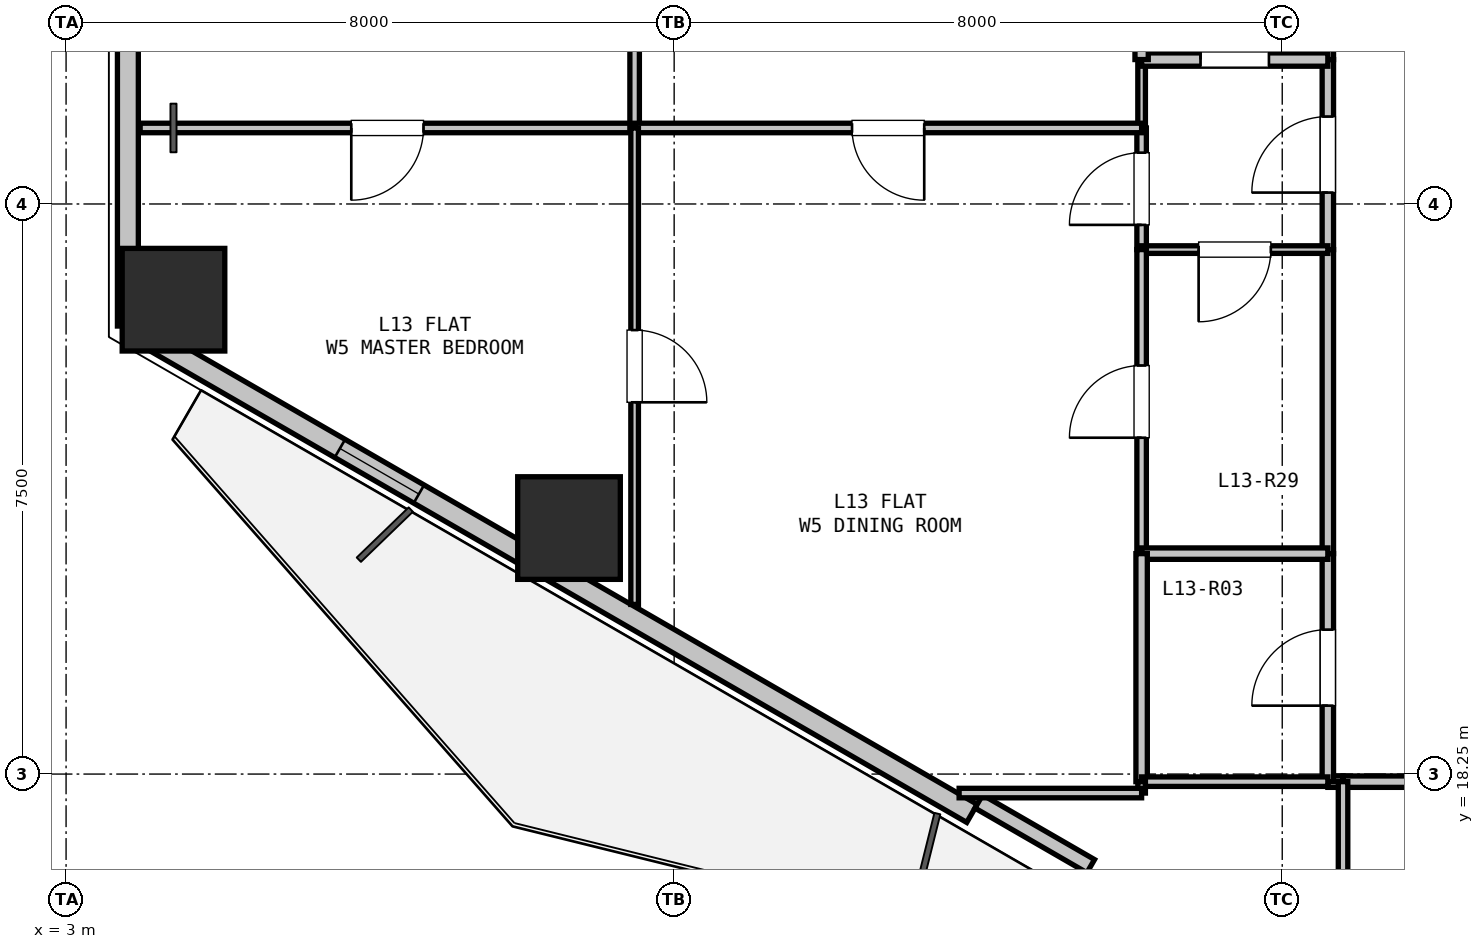
"""IFC4 building model, lengths in metres.
Left out: names, types, materials, properties, quantities, classifications, styles, units other than length and angle.
Written with IfcOpenShell. Run it as: python <this file> out.ifc"""

import sys

from ifc_helpers import new_model, si_unit, direction, frame, frame_2d, origin, origin_2d, place, context, subcontext, project, spatial, rectangle, hollow_rectangle, extrude, element, fill, save


model = new_model("IFC4")
c1 = context("Model", 3, precision=1e-05, world=origin(), true_north=direction((0.0, 1.0)))
c2 = subcontext(c1, "Body", "Model", "MODEL_VIEW")
j1 = project(units=[si_unit("LENGTHUNIT", "METRE"), si_unit("PLANEANGLEUNIT", "RADIAN")], contexts=[c1])
p1 = place(None, origin())
s1 = spatial("IfcSite", under=j1, at=p1, CompositionType="ELEMENT")
p2 = place(p1, origin())
s2 = spatial("IfcBuilding", under=s1, at=p2, CompositionType="ELEMENT")
p3 = place(p2, frame((0.0, 0.0, 48.9)))
s3 = spatial("IfcBuildingStorey", under=s2, at=p3, CompositionType="ELEMENT", Elevation=48.9)
for number, where, z_axis, x_axis in (
    (1, (9.617, 21.486, 0.0), (0.0, 0.0, 1.0), (1.0, 0.0, 0.0)),
    (2, (4.413, 24.491, 0.0), (0.0, 0.0, 1.0), (1.0, 0.0, 0.0)),
):
    element("IfcColumn", number, at=place(p3, frame(where, z_axis=z_axis, x_axis=x_axis)), inside=s3, PredefinedType="COLUMN", context=c2, shape_type="SweptSolid", body=[
        extrude(hollow_rectangle(XDim=1.35, YDim=1.35, WallThickness=0.036, at=origin_2d()), origin(), (0.0, 0.0, 1.0), 3.3),
    ])
p4 = place(p3, frame((3.813, 24.144, 0.0), z_axis=(0.0, 0.0, 1.0), x_axis=(0.0, 1.0, 0.0)))
e3 = element("IfcWall", 3, at=p4, inside=s3, PredefinedType="SOLIDWALL", context=c2, shape_type="SweptSolid", body=[
    extrude(rectangle(XDim=5.211, YDim=0.275, at=frame_2d((2.606, 0.0))), origin(), (0.0, 0.0, 1.0), 2.66),
])
p5 = place(p3, frame((14.918, 17.733, 0.0), z_axis=(0.0, 0.0, 1.0), x_axis=(-0.866027105532, 0.499997052475, 0.0)))
e4 = element("IfcWall", 4, at=p5, inside=s3, PredefinedType="SOLIDWALL", context=c2, shape_type="SweptSolid", body=[
    extrude(rectangle(XDim=12.673, YDim=0.275, at=frame_2d((6.336, 0.0))), origin(), (0.0, 0.0, 1.0), 2.66),
])
p6 = place(p5, frame((8.402, 0.0, 0.9)))
e5 = element("IfcOpeningElement", 5, at=p6, cuts=e4, PredefinedType="OPENING", context=c2, shape_type="SweptSolid", body=[
    extrude(rectangle(XDim=1.2, YDim=1.4, at=frame_2d((0.6, 0.7))), frame((0.0, 0.147, 0.0), z_axis=(0.0, -1.0, 0.0), x_axis=(1.0, 0.0, 0.0)), (0.0, 0.0, 1.0), 0.295),
])
p7 = place(p3, frame((16.48, 17.039, 0.0), z_axis=(0.0, 0.0, 1.0), x_axis=(-0.86605165483, 0.499954529098, 0.0)))
e6 = element("IfcWall", 6, at=p7, inside=s3, PredefinedType="PARAPET", context=c2, shape_type="SweptSolid", body=[
    extrude(rectangle(XDim=1.7, YDim=0.2, at=frame_2d((0.85, 0.0))), origin(), (0.0, 0.0, 1.0), 2.66),
])
p8 = place(p3, frame((22.6, 18.15, 0.0), z_axis=(0.0, 0.0, 1.0), x_axis=(-1.0, 0.0, 0.0)))
e7 = element("IfcWall", 7, at=p8, inside=s3, PredefinedType="PARTITIONING", context=c2, shape_type="SweptSolid", body=[
    extrude(rectangle(XDim=2.8, YDim=0.15, at=frame_2d((1.4, 0.0))), origin(), (0.0, 0.0, 1.0), 3.04),
])
p9 = place(p8, frame((0.9, 0.0, 0.0)))
e8 = element("IfcOpeningElement", 8, at=p9, cuts=e7, PredefinedType="OPENING", context=c2, shape_type="SweptSolid", body=[
    extrude(rectangle(XDim=1.0, YDim=2.15, at=frame_2d((0.5, 1.075))), frame((0.0, 0.085, 0.0), z_axis=(0.0, -1.0, 0.0), x_axis=(1.0, 0.0, 0.0)), (0.0, 0.0, 1.0), 0.17),
])
p10 = place(p3, frame((19.8, 18.15, 0.0), z_axis=(0.0, 0.0, 1.0), x_axis=(-1.0, 0.0, 0.0)))
e9 = element("IfcWall", 9, at=p10, inside=s3, PredefinedType="PARTITIONING", context=c2, shape_type="SweptSolid", body=[
    extrude(rectangle(XDim=0.2, YDim=0.15, at=frame_2d((0.1, 0.0))), origin(), (0.0, 0.0, 1.0), 3.04),
])
p11 = place(p3, frame((19.6, 18.15, 0.0), z_axis=(0.0, 0.0, 1.0), x_axis=(0.0, 1.0, 0.0)))
e10 = element("IfcWall", 10, at=p11, inside=s3, PredefinedType="PARTITIONING", context=c2, shape_type="SweptSolid", body=[
    extrude(rectangle(XDim=3.0, YDim=0.15, at=frame_2d((1.5, 0.0))), origin(), (0.0, 0.0, 1.0), 2.338),
])
p12 = place(p11, frame((1.0, 0.0, 0.0)))
e11 = element("IfcOpeningElement", 11, at=p12, cuts=e10, PredefinedType="OPENING", context=c2, shape_type="SweptSolid", body=[
    extrude(rectangle(XDim=1.0, YDim=2.15, at=frame_2d((0.5, 1.075))), frame((0.0, 0.085, 0.0), z_axis=(0.0, -1.0, 0.0), x_axis=(1.0, 0.0, 0.0)), (0.0, 0.0, 1.0), 0.17),
])
p13 = place(p3, frame((19.6, 21.15, 0.0), z_axis=(0.0, 0.0, 1.0), x_axis=(0.0, 1.0, 0.0)))
e12 = element("IfcWall", 12, at=p13, inside=s3, PredefinedType="PARTITIONING", context=c2, shape_type="SweptSolid", body=[
    extrude(rectangle(XDim=4.0, YDim=0.15, at=frame_2d((2.0, 0.0))), origin(), (0.0, 0.0, 1.0), 3.04),
])
p14 = place(p3, frame((19.6, 25.15, 0.0), z_axis=(0.0, 0.0, 1.0), x_axis=(0.0, 1.0, 0.0)))
e13 = element("IfcWall", 13, at=p14, inside=s3, PredefinedType="PARTITIONING", context=c2, shape_type="SweptSolid", body=[
    extrude(rectangle(XDim=2.5, YDim=0.15, at=frame_2d((1.25, 0.0))), origin(), (0.0, 0.0, 1.0), 3.04),
])
p15 = place(p14, frame((0.75, 0.0, 0.0)))
e14 = element("IfcOpeningElement", 14, at=p15, cuts=e13, PredefinedType="OPENING", context=c2, shape_type="SweptSolid", body=[
    extrude(rectangle(XDim=1.0, YDim=2.15, at=frame_2d((0.5, 1.075))), frame((0.0, 0.085, 0.0), z_axis=(0.0, -1.0, 0.0), x_axis=(1.0, 0.0, 0.0)), (0.0, 0.0, 1.0), 0.17),
])
p16 = place(p3, frame((19.6, 27.65, 0.0), z_axis=(0.0, 0.0, 1.0), x_axis=(0.0, 1.0, 0.0)))
e15 = element("IfcWall", 15, at=p16, inside=s3, PredefinedType="PARTITIONING", context=c2, shape_type="SweptSolid", body=[
    extrude(rectangle(XDim=2.1, YDim=0.15, at=frame_2d((1.05, 0.0))), origin(), (0.0, 0.0, 1.0), 3.04),
])
p17 = place(p3, frame((17.15, 25.15, 0.0), z_axis=(0.0, 0.0, 1.0), x_axis=(0.0, 1.0, 0.0)))
e16 = element("IfcWall", 16, at=p17, inside=s3, PredefinedType="PARTITIONING", context=c2, shape_type="SweptSolid", body=[
    extrude(rectangle(XDim=1.6, YDim=0.125, at=frame_2d((0.8, 0.0))), origin(), (0.0, 0.0, 1.0), 3.04),
])
p18 = place(p17, frame((0.325, 0.0, 0.0)))
e17 = element("IfcOpeningElement", 17, at=p18, cuts=e16, PredefinedType="OPENING", context=c2, shape_type="SweptSolid", body=[
    extrude(rectangle(XDim=0.95, YDim=2.1, at=frame_2d((0.475, 1.05))), frame((0.0, 0.073, 0.0), z_axis=(0.0, -1.0, 0.0), x_axis=(1.0, 0.0, 0.0)), (0.0, 0.0, 1.0), 0.145),
])
p19 = place(p3, frame((17.15, 26.75, 0.0), z_axis=(0.0, 0.0, 1.0), x_axis=(0.0, 1.0, 0.0)))
e18 = element("IfcWall", 18, at=p19, inside=s3, PredefinedType="PARTITIONING", context=c2, shape_type="SweptSolid", body=[
    extrude(rectangle(XDim=0.9, YDim=0.1, at=frame_2d((0.45, 0.0))), origin(), (0.0, 0.0, 1.0), 3.04),
])
p20 = place(p3, frame((17.15, 27.65, 0.0), z_axis=(0.0, 0.0, 1.0), x_axis=(1.0, 0.0, 0.0)))
e19 = element("IfcWall", 19, at=p20, inside=s3, PredefinedType="PLUMBINGWALL", context=c2, shape_type="SweptSolid", body=[
    extrude(rectangle(XDim=2.45, YDim=0.175, at=frame_2d((1.225, 0.0))), origin(), (0.0, 0.0, 1.0), 3.04),
])
p21 = place(p20, frame((0.775, 0.0, 0.0)))
e20 = element("IfcOpeningElement", 20, at=p21, cuts=e19, PredefinedType="OPENING", context=c2, shape_type="SweptSolid", body=[
    extrude(rectangle(XDim=0.9, YDim=2.1, at=frame_2d((0.45, 1.05))), frame((0.0, 0.097, 0.0), z_axis=(0.0, -1.0, 0.0), x_axis=(1.0, 0.0, 0.0)), (0.0, 0.0, 1.0), 0.195),
])
p22 = place(p3, frame((19.6, 25.15, 0.0), z_axis=(0.0, 0.0, 1.0), x_axis=(-1.0, 0.0, 0.0)))
e21 = element("IfcWall", 21, at=p22, inside=s3, PredefinedType="PARTITIONING", context=c2, shape_type="SweptSolid", body=[
    extrude(rectangle(XDim=2.45, YDim=0.1, at=frame_2d((1.225, 0.0))), origin(), (0.0, 0.0, 1.0), 3.04),
])
p23 = place(p22, frame((0.75, 0.0, 0.0)))
e22 = element("IfcOpeningElement", 22, at=p23, cuts=e21, PredefinedType="OPENING", context=c2, shape_type="SweptSolid", body=[
    extrude(rectangle(XDim=0.95, YDim=2.1, at=frame_2d((0.475, 1.05))), frame((0.0, 0.06, 0.0), z_axis=(0.0, -1.0, 0.0), x_axis=(1.0, 0.0, 0.0)), (0.0, 0.0, 1.0), 0.12),
])
p24 = place(p3, frame((17.15, 27.65, 0.0), z_axis=(0.0, 0.0, 1.0), x_axis=(0.0, 1.0, 0.0)))
e23 = element("IfcWall", 23, at=p24, inside=s3, PredefinedType="PLUMBINGWALL", context=c2, shape_type="SweptSolid", body=[
    extrude(rectangle(XDim=2.1, YDim=0.175, at=frame_2d((1.05, 0.0))), origin(), (0.0, 0.0, 1.0), 3.04),
])
p25 = place(p3, frame((17.15, 21.15, 0.0), z_axis=(0.0, 0.0, 1.0), x_axis=(0.0, 1.0, 0.0)))
e24 = element("IfcWall", 24, at=p25, inside=s3, PredefinedType="PARTITIONING", context=c2, shape_type="SweptSolid", body=[
    extrude(rectangle(XDim=4.0, YDim=0.125, at=frame_2d((2.0, 0.0))), origin(), (0.0, 0.0, 1.0), 2.338),
])
p26 = place(p25, frame((1.525, 0.0, 0.0)))
e25 = element("IfcOpeningElement", 25, at=p26, cuts=e24, PredefinedType="OPENING", context=c2, shape_type="SweptSolid", body=[
    extrude(rectangle(XDim=0.95, YDim=2.1, at=frame_2d((0.475, 1.05))), frame((0.0, 0.073, 0.0), z_axis=(0.0, -1.0, 0.0), x_axis=(1.0, 0.0, 0.0)), (0.0, 0.0, 1.0), 0.145),
])
p27 = place(p3, frame((19.6, 21.15, 0.0), z_axis=(0.0, 0.0, 1.0), x_axis=(-1.0, 0.0, 0.0)))
e26 = element("IfcWall", 26, at=p27, inside=s3, PredefinedType="PARTITIONING", context=c2, shape_type="SweptSolid", body=[
    extrude(rectangle(XDim=2.45, YDim=0.15, at=frame_2d((1.225, 0.0))), origin(), (0.0, 0.0, 1.0), 2.338),
])
p28 = place(p3, frame((17.15, 18.15, 0.0), z_axis=(0.0, 0.0, 1.0), x_axis=(0.0, 1.0, 0.0)))
e27 = element("IfcWall", 27, at=p28, inside=s3, PredefinedType="PARTITIONING", context=c2, shape_type="SweptSolid", body=[
    extrude(rectangle(XDim=3.0, YDim=0.15, at=frame_2d((1.5, 0.0))), origin(), (0.0, 0.0, 1.0), 3.04),
])
p29 = place(p3, frame((19.6, 18.15, 0.0), z_axis=(0.0, 0.0, 1.0), x_axis=(-1.0, 0.0, 0.0)))
e28 = element("IfcWall", 28, at=p29, inside=s3, PredefinedType="PARTITIONING", context=c2, shape_type="SweptSolid", body=[
    extrude(rectangle(XDim=2.45, YDim=0.125, at=frame_2d((1.225, 0.0))), origin(), (0.0, 0.0, 1.0), 3.04),
])
p30 = place(p3, frame((19.8, 15.75, 0.0), z_axis=(0.0, 0.0, 1.0), x_axis=(0.0, 1.0, 0.0)))
e29 = element("IfcWall", 29, at=p30, inside=s3, PredefinedType="PARTITIONING", context=c2, shape_type="SweptSolid", body=[
    extrude(rectangle(XDim=2.4, YDim=0.125, at=frame_2d((1.2, 0.0))), origin(), (0.0, 0.0, 1.0), 2.65),
])
p31 = place(p3, frame((10.48, 26.75, 0.0), z_axis=(0.0, 0.0, 1.0), x_axis=(-1.0, 0.0, 0.0)))
e30 = element("IfcWall", 30, at=p31, inside=s3, PredefinedType="PARTITIONING", context=c2, shape_type="SweptSolid", body=[
    extrude(rectangle(XDim=6.505, YDim=0.125, at=frame_2d((3.253, 0.0))), origin(), (0.0, 0.0, 1.0), 2.65),
])
p32 = place(p31, frame((2.778, 0.0, 0.0)))
e31 = element("IfcOpeningElement", 31, at=p32, cuts=e30, PredefinedType="OPENING", context=c2, shape_type="SweptSolid", body=[
    extrude(rectangle(XDim=0.95, YDim=2.1, at=frame_2d((0.475, 1.05))), frame((0.0, 0.073, 0.0), z_axis=(0.0, -1.0, 0.0), x_axis=(1.0, 0.0, 0.0)), (0.0, 0.0, 1.0), 0.145),
])
p33 = place(p3, frame((10.48, 33.018, 0.0), z_axis=(0.0, 0.0, 1.0), x_axis=(0.0, -1.0, 0.0)))
e32 = element("IfcWall", 32, at=p33, inside=s3, PredefinedType="PARTITIONING", context=c2, shape_type="SweptSolid", body=[
    extrude(rectangle(XDim=6.268, YDim=0.125, at=frame_2d((3.134, 0.0))), origin(), (0.0, 0.0, 1.0), 2.338),
])
p34 = place(p33, frame((2.659, 0.0, 0.0)))
e33 = element("IfcOpeningElement", 33, at=p34, cuts=e32, PredefinedType="OPENING", context=c2, shape_type="SweptSolid", body=[
    extrude(rectangle(XDim=0.95, YDim=2.1, at=frame_2d((0.475, 1.05))), frame((0.0, 0.073, 0.0), z_axis=(0.0, -1.0, 0.0), x_axis=(1.0, 0.0, 0.0)), (0.0, 0.0, 1.0), 0.145),
])
p35 = place(p3, frame((17.15, 26.75, 0.0), z_axis=(0.0, 0.0, 1.0), x_axis=(-1.0, 0.0, 0.0)))
e34 = element("IfcWall", 34, at=p35, inside=s3, PredefinedType="PARTITIONING", context=c2, shape_type="SweptSolid", body=[
    extrude(rectangle(XDim=6.67, YDim=0.125, at=frame_2d((3.335, 0.0))), origin(), (0.0, 0.0, 1.0), 3.04),
])
p36 = place(p35, frame((2.86, 0.0, 0.0)))
e35 = element("IfcOpeningElement", 35, at=p36, cuts=e34, PredefinedType="OPENING", context=c2, shape_type="SweptSolid", body=[
    extrude(rectangle(XDim=0.95, YDim=2.1, at=frame_2d((0.475, 1.05))), frame((0.0, 0.073, 0.0), z_axis=(0.0, -1.0, 0.0), x_axis=(1.0, 0.0, 0.0)), (0.0, 0.0, 1.0), 0.145),
])
p37 = place(p3, frame((10.48, 26.75, 0.0), z_axis=(0.0, 0.0, 1.0), x_axis=(0.0, -1.0, 0.0)))
e36 = element("IfcWall", 36, at=p37, inside=s3, PredefinedType="PARTITIONING", context=c2, shape_type="SweptSolid", body=[
    extrude(rectangle(XDim=6.268, YDim=0.1, at=frame_2d((3.134, 0.0))), origin(), (0.0, 0.0, 1.0), 2.338),
])
p38 = place(p37, frame((2.659, 0.0, 0.0)))
e37 = element("IfcOpeningElement", 37, at=p38, cuts=e36, PredefinedType="OPENING", context=c2, shape_type="SweptSolid", body=[
    extrude(rectangle(XDim=0.95, YDim=2.1, at=frame_2d((0.475, 1.05))), frame((0.0, 0.06, 0.0), z_axis=(0.0, -1.0, 0.0), x_axis=(1.0, 0.0, 0.0)), (0.0, 0.0, 1.0), 0.12),
])
p39 = place(p3, frame((3.943, 24.069, 0.0), z_axis=(0.0, 0.0, 1.0), x_axis=(-0.866131372301, 0.499816412211, 0.0)))
e38 = element("IfcWall", 38, at=p39, inside=s3, PredefinedType="PARTITIONING", context=c2, shape_type="SweptSolid", body=[
    extrude(rectangle(XDim=0.15, YDim=0.125, at=frame_2d((0.075, 0.0))), origin(), (0.0, 0.0, 1.0), 3.04),
])
p40 = place(p3, frame((17.15, 18.15, 0.0), z_axis=(0.0, 0.0, 1.0), x_axis=(0.0, -1.0, 0.0)))
e39 = element("IfcWall", 39, at=p40, inside=s3, PredefinedType="PARTITIONING", context=c2, shape_type="SweptSolid", body=[
    extrude(rectangle(XDim=0.15, YDim=0.1, at=frame_2d((0.075, 0.0))), origin(), (0.0, 0.0, 1.0), 3.04),
])
p41 = place(p3, frame((17.15, 18.0, 0.0), z_axis=(0.0, 0.0, 1.0), x_axis=(-1.0, 0.0, 0.0)))
e40 = element("IfcWall", 40, at=p41, inside=s3, PredefinedType="PARTITIONING", context=c2, shape_type="SweptSolid", body=[
    extrude(rectangle(XDim=2.401, YDim=0.125, at=frame_2d((1.2, 0.0))), origin(), (0.0, 0.0, 1.0), 2.365),
])
p42 = place(p6, origin())
e41 = element("IfcWindow", 41, at=p42, inside=s3, PartitioningType="SINGLE_PANEL", PredefinedType="WINDOW", context=c2, shape_type="SweptSolid", body=[
    extrude(rectangle(XDim=1.2, YDim=1.4, at=frame_2d((0.6, 0.7))), frame((0.0, 0.03, 0.0), z_axis=(0.0, -1.0, 0.0), x_axis=(1.0, 0.0, 0.0)), (0.0, 0.0, 1.0), 0.06),
])
fill(e5, e41)
p43 = place(p15, origin())
e42 = element("IfcDoor", 42, at=p43, inside=s3, OperationType="SINGLE_SWING_LEFT", PredefinedType="DOOR", context=c2, shape_type="SweptSolid", body=[
    extrude(rectangle(XDim=1.0, YDim=2.15, at=frame_2d((0.5, 1.075))), frame((0.0, 0.025, 0.0), z_axis=(0.0, -1.0, 0.0), x_axis=(1.0, 0.0, 0.0)), (0.0, 0.0, 1.0), 0.05),
])
fill(e14, e42)
p44 = place(p12, origin())
e43 = element("IfcDoor", 43, at=p44, inside=s3, OperationType="SINGLE_SWING_LEFT", PredefinedType="DOOR", context=c2, shape_type="SweptSolid", body=[
    extrude(rectangle(XDim=1.0, YDim=2.15, at=frame_2d((0.5, 1.075))), frame((0.0, 0.025, 0.0), z_axis=(0.0, -1.0, 0.0), x_axis=(1.0, 0.0, 0.0)), (0.0, 0.0, 1.0), 0.05),
])
fill(e11, e43)
p45 = place(p21, origin())
e44 = element("IfcDoor", 44, at=p45, inside=s3, OperationType="SINGLE_SWING_LEFT", PredefinedType="DOOR", context=c2, shape_type="SweptSolid", body=[
    extrude(rectangle(XDim=0.9, YDim=2.1, at=frame_2d((0.45, 1.05))), frame((0.0, 0.025, 0.0), z_axis=(0.0, -1.0, 0.0), x_axis=(1.0, 0.0, 0.0)), (0.0, 0.0, 1.0), 0.05),
])
fill(e20, e44)
p46 = place(p23, origin())
e45 = element("IfcDoor", 45, at=p46, inside=s3, OperationType="SINGLE_SWING_RIGHT", PredefinedType="DOOR", context=c2, shape_type="SweptSolid", body=[
    extrude(rectangle(XDim=0.95, YDim=2.1, at=frame_2d((0.475, 1.05))), frame((0.0, 0.025, 0.0), z_axis=(0.0, -1.0, 0.0), x_axis=(1.0, 0.0, 0.0)), (0.0, 0.0, 1.0), 0.05),
])
fill(e22, e45)
p47 = place(p18, origin())
e46 = element("IfcDoor", 46, at=p47, inside=s3, OperationType="SINGLE_SWING_LEFT", PredefinedType="DOOR", context=c2, shape_type="SweptSolid", body=[
    extrude(rectangle(XDim=0.95, YDim=2.1, at=frame_2d((0.475, 1.05))), frame((0.0, 0.025, 0.0), z_axis=(0.0, -1.0, 0.0), x_axis=(1.0, 0.0, 0.0)), (0.0, 0.0, 1.0), 0.05),
])
fill(e17, e46)
p48 = place(p26, origin())
e47 = element("IfcDoor", 47, at=p48, inside=s3, OperationType="SINGLE_SWING_LEFT", PredefinedType="DOOR", context=c2, shape_type="SweptSolid", body=[
    extrude(rectangle(XDim=0.95, YDim=2.1, at=frame_2d((0.475, 1.05))), frame((0.0, 0.025, 0.0), z_axis=(0.0, -1.0, 0.0), x_axis=(1.0, 0.0, 0.0)), (0.0, 0.0, 1.0), 0.05),
])
fill(e25, e47)
p49 = place(p32, origin())
e48 = element("IfcDoor", 48, at=p49, inside=s3, OperationType="SINGLE_SWING_RIGHT", PredefinedType="DOOR", context=c2, shape_type="SweptSolid", body=[
    extrude(rectangle(XDim=0.95, YDim=2.1, at=frame_2d((0.475, 1.05))), frame((0.0, 0.025, 0.0), z_axis=(0.0, -1.0, 0.0), x_axis=(1.0, 0.0, 0.0)), (0.0, 0.0, 1.0), 0.05),
])
fill(e31, e48)
p50 = place(p36, origin())
e49 = element("IfcDoor", 49, at=p50, inside=s3, OperationType="SINGLE_SWING_LEFT", PredefinedType="DOOR", context=c2, shape_type="SweptSolid", body=[
    extrude(rectangle(XDim=0.95, YDim=2.1, at=frame_2d((0.475, 1.05))), frame((0.0, 0.025, 0.0), z_axis=(0.0, -1.0, 0.0), x_axis=(1.0, 0.0, 0.0)), (0.0, 0.0, 1.0), 0.05),
])
fill(e35, e49)
p51 = place(p38, origin())
e50 = element("IfcDoor", 50, at=p51, inside=s3, OperationType="SINGLE_SWING_RIGHT", PredefinedType="DOOR", context=c2, shape_type="SweptSolid", body=[
    extrude(rectangle(XDim=0.95, YDim=2.1, at=frame_2d((0.475, 1.05))), frame((0.0, 0.025, 0.0), z_axis=(0.0, -1.0, 0.0), x_axis=(1.0, 0.0, 0.0)), (0.0, 0.0, 1.0), 0.05),
])
fill(e37, e50)
save(model, sys.argv[1])
